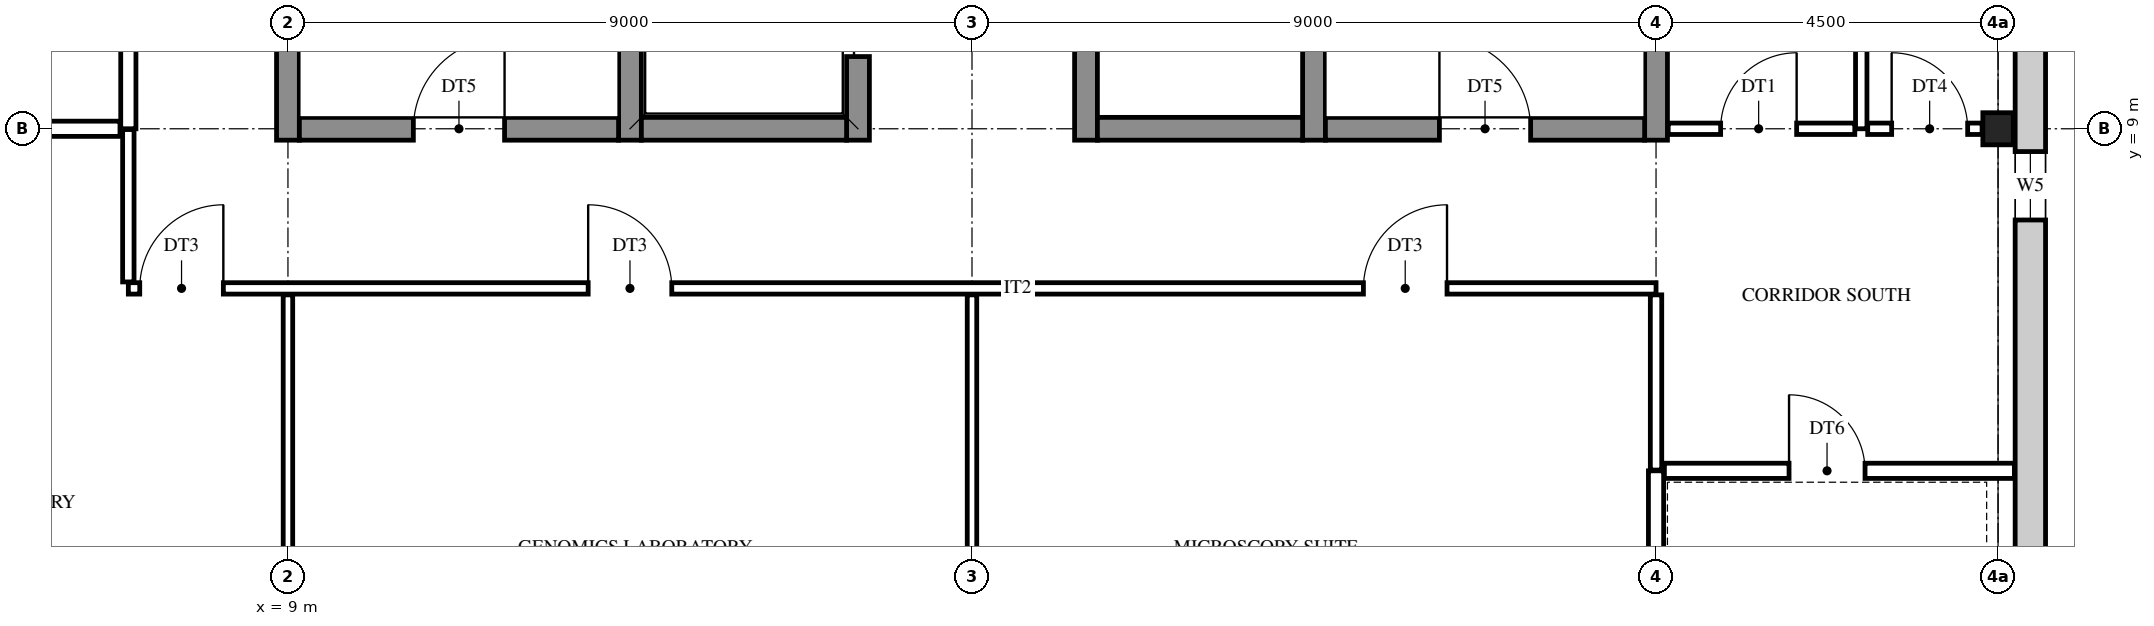
"""IFC4 building model, lengths in metres.
Left out: names, types, materials, properties, quantities, classifications, styles, units other than length and angle.
Written with IfcOpenShell. Run it as: python <this file> out.ifc"""

import sys

from ifc_helpers import new_model, si_unit, direction, frame, frame_2d, origin, origin_2d, place, context, subcontext, project, spatial, rectangle, i_section, extrude, element, fill, save


model = new_model("IFC4")
c1 = context("Model", 3, precision=1e-05, world=origin(), true_north=direction((0.0, 1.0)))
c2 = subcontext(c1, "Body", "Model", "MODEL_VIEW")
j1 = project(units=[si_unit("LENGTHUNIT", "METRE"), si_unit("PLANEANGLEUNIT", "RADIAN")], contexts=[c1])
p1 = place(None, origin())
s1 = spatial("IfcSite", under=j1, at=p1, CompositionType="ELEMENT")
p2 = place(p1, origin())
s2 = spatial("IfcBuilding", under=s1, at=p2, CompositionType="ELEMENT")
p3 = place(p2, frame((0.0, 0.0, 19.2)))
s3 = spatial("IfcBuildingStorey", under=s2, at=p3, CompositionType="ELEMENT", Elevation=19.2)
p4 = place(p3, frame((31.5, 9.0, 0.0), z_axis=(0.0, 0.0, 1.0), x_axis=(1.0, 0.0, 0.0)))
e1 = element("IfcColumn", 1, at=p4, inside=s3, PredefinedType="COLUMN", context=c2, shape_type="SweptSolid", body=[
    extrude(i_section(OverallWidth=0.4, OverallDepth=0.422, WebThickness=0.028, FlangeThickness=0.036, at=origin_2d()), origin(), (0.0, 0.0, 1.0), 4.2),
])
for number, where, z_axis, x_axis in (
    (2, (9.0, 8.85, 0.0), (0.0, 0.0, 1.0), (0.0, 1.0, 0.0)),
    (3, (13.5, 8.85, 0.0), (0.0, 0.0, 1.0), (0.0, 1.0, 0.0)),
):
    element("IfcWall", number, at=place(p3, frame(where, z_axis=z_axis, x_axis=x_axis)), inside=s3, PredefinedType="SHEAR", context=c2, shape_type="SweptSolid", body=[
        extrude(rectangle(XDim=9.3, YDim=0.3, at=frame_2d((4.65, 0.0))), origin(), (0.0, 0.0, 1.0), 4.2),
    ])
p5 = place(p3, frame((16.5, 8.85, 0.0), z_axis=(0.0, 0.0, 1.0), x_axis=(0.0, 1.0, 0.0)))
e4 = element("IfcWall", 4, at=p5, inside=s3, PredefinedType="SHEAR", context=c2, shape_type="SweptSolid", body=[
    extrude(rectangle(XDim=9.3, YDim=0.3, at=frame_2d((4.65, 0.0))), origin(), (0.0, 0.0, 1.0), 4.2),
])
p6 = place(p5, frame((1.1, 0.0, 0.0)))
e5 = element("IfcOpeningElement", 5, at=p6, cuts=e4, PredefinedType="OPENING", context=c2, shape_type="SweptSolid", body=[
    extrude(rectangle(XDim=1.1, YDim=2.1, at=frame_2d((0.55, 1.05))), frame((0.0, 0.16, 0.0), z_axis=(0.0, -1.0, 0.0), x_axis=(1.0, 0.0, 0.0)), (0.0, 0.0, 1.0), 0.32),
])
p7 = place(p5, frame((4.1, 0.0, 0.0)))
e6 = element("IfcOpeningElement", 6, at=p7, cuts=e4, PredefinedType="OPENING", context=c2, shape_type="SweptSolid", body=[
    extrude(rectangle(XDim=1.1, YDim=2.1, at=frame_2d((0.55, 1.05))), frame((0.0, 0.16, 0.0), z_axis=(0.0, -1.0, 0.0), x_axis=(1.0, 0.0, 0.0)), (0.0, 0.0, 1.0), 0.32),
])
p8 = place(p3, frame((19.5, 8.85, 0.0), z_axis=(0.0, 0.0, 1.0), x_axis=(0.0, 1.0, 0.0)))
e7 = element("IfcWall", 7, at=p8, inside=s3, PredefinedType="SHEAR", context=c2, shape_type="SweptSolid", body=[
    extrude(rectangle(XDim=9.3, YDim=0.3, at=frame_2d((4.65, 0.0))), origin(), (0.0, 0.0, 1.0), 4.2),
])
p9 = place(p8, frame((3.95, 0.0, 0.0)))
e8 = element("IfcOpeningElement", 8, at=p9, cuts=e7, PredefinedType="OPENING", context=c2, shape_type="SweptSolid", body=[
    extrude(rectangle(XDim=1.4, YDim=2.1, at=frame_2d((0.7, 1.05))), frame((0.0, 0.16, 0.0), z_axis=(0.0, -1.0, 0.0), x_axis=(1.0, 0.0, 0.0)), (0.0, 0.0, 1.0), 0.32),
])
p10 = place(p8, frame((7.1, 0.0, 0.0)))
e9 = element("IfcOpeningElement", 9, at=p10, cuts=e7, PredefinedType="OPENING", context=c2, shape_type="SweptSolid", body=[
    extrude(rectangle(XDim=1.1, YDim=2.1, at=frame_2d((0.55, 1.05))), frame((0.0, 0.16, 0.0), z_axis=(0.0, -1.0, 0.0), x_axis=(1.0, 0.0, 0.0)), (0.0, 0.0, 1.0), 0.32),
])
for number, where, z_axis, x_axis in (
    (10, (22.5, 8.85, 0.0), (0.0, 0.0, 1.0), (0.0, 1.0, 0.0)),
    (11, (27.0, 8.85, 0.0), (0.0, 0.0, 1.0), (0.0, 1.0, 0.0)),
):
    element("IfcWall", number, at=place(p3, frame(where, z_axis=z_axis, x_axis=x_axis)), inside=s3, PredefinedType="SHEAR", context=c2, shape_type="SweptSolid", body=[
        extrude(rectangle(XDim=9.3, YDim=0.3, at=frame_2d((4.65, 0.0))), origin(), (0.0, 0.0, 1.0), 4.2),
    ])
p11 = place(p3, frame((9.15, 9.0, 0.0), z_axis=(0.0, 0.0, 1.0), x_axis=(1.0, 0.0, 0.0)))
e12 = element("IfcWall", 12, at=p11, inside=s3, PredefinedType="SHEAR", context=c2, shape_type="SweptSolid", body=[
    extrude(rectangle(XDim=4.2, YDim=0.3, at=frame_2d((2.1, 0.0))), origin(), (0.0, 0.0, 1.0), 4.2),
])
p12 = place(p11, frame((1.5, 0.0, 0.0)))
e13 = element("IfcOpeningElement", 13, at=p12, cuts=e12, PredefinedType="OPENING", context=c2, shape_type="SweptSolid", body=[
    extrude(rectangle(XDim=1.2, YDim=2.1, at=frame_2d((0.6, 1.05))), frame((0.0, 0.16, 0.0), z_axis=(0.0, -1.0, 0.0), x_axis=(1.0, 0.0, 0.0)), (0.0, 0.0, 1.0), 0.32),
])
for number, where, z_axis, x_axis in (
    (14, (13.65, 9.0, 0.0), (0.0, 0.0, 1.0), (1.0, 0.0, 0.0)),
    (15, (19.65, 9.0, 0.0), (0.0, 0.0, 1.0), (1.0, 0.0, 0.0)),
):
    element("IfcWall", number, at=place(p3, frame(where, z_axis=z_axis, x_axis=x_axis)), inside=s3, PredefinedType="SHEAR", context=c2, shape_type="SweptSolid", body=[
        extrude(rectangle(XDim=2.7, YDim=0.3, at=frame_2d((1.35, 0.0))), origin(), (0.0, 0.0, 1.0), 4.2),
    ])
p13 = place(p3, frame((22.65, 9.0, 0.0), z_axis=(0.0, 0.0, 1.0), x_axis=(1.0, 0.0, 0.0)))
e16 = element("IfcWall", 16, at=p13, inside=s3, PredefinedType="SHEAR", context=c2, shape_type="SweptSolid", body=[
    extrude(rectangle(XDim=4.2, YDim=0.3, at=frame_2d((2.1, 0.0))), origin(), (0.0, 0.0, 1.0), 4.2),
])
p14 = place(p13, frame((1.5, 0.0, 0.0)))
e17 = element("IfcOpeningElement", 17, at=p14, cuts=e16, PredefinedType="OPENING", context=c2, shape_type="SweptSolid", body=[
    extrude(rectangle(XDim=1.2, YDim=2.1, at=frame_2d((0.6, 1.05))), frame((0.0, 0.16, 0.0), z_axis=(0.0, -1.0, 0.0), x_axis=(1.0, 0.0, 0.0)), (0.0, 0.0, 1.0), 0.32),
])
p15 = place(p3, frame((31.925, 27.225, 0.0), z_axis=(0.0, 0.0, 1.0), x_axis=(0.0, -1.0, 0.0)))
e18 = element("IfcWall", 18, at=p15, inside=s3, PredefinedType="STANDARD", context=c2, shape_type="SweptSolid", body=[
    extrude(rectangle(XDim=27.45, YDim=0.4, at=frame_2d((13.725, 0.0))), origin(), (0.0, 0.0, 1.0), 4.2),
])
p16 = place(p15, frame((26.025, 0.0, 0.9)))
e19 = element("IfcOpeningElement", 19, at=p16, cuts=e18, PredefinedType="OPENING", context=c2, shape_type="SweptSolid", body=[
    extrude(rectangle(XDim=0.9, YDim=2.0, at=frame_2d((0.45, 1.0))), frame((0.0, 0.21, 0.0), z_axis=(0.0, -1.0, 0.0), x_axis=(1.0, 0.0, 0.0)), (0.0, 0.0, 1.0), 0.42),
])
p17 = place(p15, frame((18.525, 0.0, 0.9)))
e20 = element("IfcOpeningElement", 20, at=p17, cuts=e18, PredefinedType="OPENING", context=c2, shape_type="SweptSolid", body=[
    extrude(rectangle(XDim=0.9, YDim=2.0, at=frame_2d((0.45, 1.0))), frame((0.0, 0.21, 0.0), z_axis=(0.0, -1.0, 0.0), x_axis=(1.0, 0.0, 0.0)), (0.0, 0.0, 1.0), 0.42),
])
p18 = place(p15, frame((15.675, 0.0, 1.6)))
e21 = element("IfcOpeningElement", 21, at=p18, cuts=e18, PredefinedType="OPENING", context=c2, shape_type="SweptSolid", body=[
    extrude(rectangle(XDim=0.6, YDim=0.9, at=frame_2d((0.3, 0.45))), frame((0.0, 0.21, 0.0), z_axis=(0.0, -1.0, 0.0), x_axis=(1.0, 0.0, 0.0)), (0.0, 0.0, 1.0), 0.42),
])
p19 = place(p15, frame((11.175, 0.0, 1.6)))
e22 = element("IfcOpeningElement", 22, at=p19, cuts=e18, PredefinedType="OPENING", context=c2, shape_type="SweptSolid", body=[
    extrude(rectangle(XDim=0.6, YDim=0.9, at=frame_2d((0.3, 0.45))), frame((0.0, 0.21, 0.0), z_axis=(0.0, -1.0, 0.0), x_axis=(1.0, 0.0, 0.0)), (0.0, 0.0, 1.0), 0.42),
])
p20 = place(p15, frame((8.025, 0.0, 0.9)))
e23 = element("IfcOpeningElement", 23, at=p20, cuts=e18, PredefinedType="OPENING", context=c2, shape_type="SweptSolid", body=[
    extrude(rectangle(XDim=0.9, YDim=2.0, at=frame_2d((0.45, 1.0))), frame((0.0, 0.21, 0.0), z_axis=(0.0, -1.0, 0.0), x_axis=(1.0, 0.0, 0.0)), (0.0, 0.0, 1.0), 0.42),
])
p21 = place(p15, frame((0.525, 0.0, 0.9)))
e24 = element("IfcOpeningElement", 24, at=p21, cuts=e18, PredefinedType="OPENING", context=c2, shape_type="SweptSolid", body=[
    extrude(rectangle(XDim=0.9, YDim=2.0, at=frame_2d((0.45, 1.0))), frame((0.0, 0.21, 0.0), z_axis=(0.0, -1.0, 0.0), x_axis=(1.0, 0.0, 0.0)), (0.0, 0.0, 1.0), 0.42),
])
p22 = place(p3, frame((6.9, 6.985, 0.0), z_axis=(0.0, 0.0, 1.0), x_axis=(0.0, 1.0, 0.0)))
e25 = element("IfcWall", 25, at=p22, inside=s3, PredefinedType="PARTITIONING", context=c2, shape_type="SweptSolid", body=[
    extrude(rectangle(XDim=2.005, YDim=0.15, at=frame_2d((1.002, 0.0))), origin(), (0.0, 0.0, 1.0), 3.537),
])
p23 = place(p3, frame((6.9, 9.0, 0.0), z_axis=(0.0, 0.0, 1.0), x_axis=(0.0, 1.0, 0.0)))
e26 = element("IfcWall", 26, at=p23, inside=s3, PredefinedType="PARTITIONING", context=c2, shape_type="SweptSolid", body=[
    extrude(rectangle(XDim=9.0, YDim=0.2, at=frame_2d((4.5, 0.0))), origin(), (0.0, 0.0, 1.0), 3.537),
])
p24 = place(p23, frame((1.75, 0.0, 0.0)))
e27 = element("IfcOpeningElement", 27, at=p24, cuts=e26, PredefinedType="OPENING", context=c2, shape_type="SweptSolid", body=[
    extrude(rectangle(XDim=1.0, YDim=2.1, at=frame_2d((0.5, 1.05))), frame((0.0, 0.11, 0.0), z_axis=(0.0, -1.0, 0.0), x_axis=(1.0, 0.0, 0.0)), (0.0, 0.0, 1.0), 0.22),
])
p25 = place(p23, frame((6.25, 0.0, 0.0)))
e28 = element("IfcOpeningElement", 28, at=p25, cuts=e26, PredefinedType="OPENING", context=c2, shape_type="SweptSolid", body=[
    extrude(rectangle(XDim=1.0, YDim=2.1, at=frame_2d((0.5, 1.05))), frame((0.0, 0.11, 0.0), z_axis=(0.0, -1.0, 0.0), x_axis=(1.0, 0.0, 0.0)), (0.0, 0.0, 1.0), 0.22),
])
for number, where, z_axis, x_axis in (
    (29, (9.0, 0.221, 0.0), (0.0, 0.0, 1.0), (0.0, 1.0, 0.0)),
    (30, (18.0, 0.221, 0.0), (0.0, 0.0, 1.0), (0.0, 1.0, 0.0)),
):
    element("IfcWall", number, at=place(p3, frame(where, z_axis=z_axis, x_axis=x_axis)), inside=s3, PredefinedType="PARTITIONING", context=c2, shape_type="SweptSolid", body=[
        extrude(rectangle(XDim=6.594, YDim=0.125, at=frame_2d((3.297, 0.0))), origin(), (0.0, 0.0, 1.0), 3.537),
    ])
p26 = place(p3, frame((27.0, 0.221, 0.0), z_axis=(0.0, 0.0, 1.0), x_axis=(0.0, 1.0, 0.0)))
e31 = element("IfcWall", 31, at=p26, inside=s3, PredefinedType="PARTITIONING", context=c2, shape_type="SweptSolid", body=[
    extrude(rectangle(XDim=4.279, YDim=0.2, at=frame_2d((2.14, 0.0))), origin(), (0.0, 0.0, 1.0), 3.537),
])
p27 = place(p3, frame((27.0, 4.51, 0.0), z_axis=(0.0, 0.0, 1.0), x_axis=(0.0, 1.0, 0.0)))
e32 = element("IfcWall", 32, at=p27, inside=s3, PredefinedType="PARTITIONING", context=c2, shape_type="SweptSolid", body=[
    extrude(rectangle(XDim=2.305, YDim=0.15, at=frame_2d((1.152, 0.0))), origin(), (0.0, 0.0, 1.0), 3.537),
])
p28 = place(p3, frame((29.7, 9.0, 0.0), z_axis=(0.0, 0.0, 1.0), x_axis=(0.0, 1.0, 0.0)))
e33 = element("IfcWall", 33, at=p28, inside=s3, PredefinedType="PARTITIONING", context=c2, shape_type="SweptSolid", body=[
    extrude(rectangle(XDim=6.3, YDim=0.15, at=frame_2d((3.15, 0.0))), origin(), (0.0, 0.0, 1.0), 3.537),
])
p29 = place(p28, frame((4.0, 0.0, 0.0)))
e34 = element("IfcOpeningElement", 34, at=p29, cuts=e33, PredefinedType="OPENING", context=c2, shape_type="SweptSolid", body=[
    extrude(rectangle(XDim=1.0, YDim=2.1, at=frame_2d((0.5, 1.05))), frame((0.0, 0.085, 0.0), z_axis=(0.0, -1.0, 0.0), x_axis=(1.0, 0.0, 0.0)), (0.0, 0.0, 1.0), 0.17),
])
p30 = place(p3, frame((27.11, 4.5, 0.0), z_axis=(0.0, 0.0, 1.0), x_axis=(1.0, 0.0, 0.0)))
e35 = element("IfcWall", 35, at=p30, inside=s3, PredefinedType="PARTITIONING", context=c2, shape_type="SweptSolid", body=[
    extrude(rectangle(XDim=4.605, YDim=0.2, at=frame_2d((2.302, 0.0))), origin(), (0.0, 0.0, 1.0), 3.537),
])
p31 = place(p30, frame((1.64, 0.0, 0.0)))
e36 = element("IfcOpeningElement", 36, at=p31, cuts=e35, PredefinedType="OPENING", context=c2, shape_type="SweptSolid", body=[
    extrude(rectangle(XDim=1.0, YDim=2.1, at=frame_2d((0.5, 1.05))), frame((0.0, 0.11, 0.0), z_axis=(0.0, -1.0, 0.0), x_axis=(1.0, 0.0, 0.0)), (0.0, 0.0, 1.0), 0.22),
])
p32 = place(p3, frame((6.9, 6.9, 0.0), z_axis=(0.0, 0.0, 1.0), x_axis=(1.0, 0.0, 0.0)))
e37 = element("IfcWall", 37, at=p32, inside=s3, PredefinedType="PARTITIONING", context=c2, shape_type="SweptSolid", body=[
    extrude(rectangle(XDim=20.1, YDim=0.15, at=frame_2d((10.05, 0.0))), origin(), (0.0, 0.0, 1.0), 3.537),
])
p33 = place(p32, frame((0.15, 0.0, 0.0)))
e38 = element("IfcOpeningElement", 38, at=p33, cuts=e37, PredefinedType="OPENING", context=c2, shape_type="SweptSolid", body=[
    extrude(rectangle(XDim=1.1, YDim=2.1, at=frame_2d((0.55, 1.05))), frame((0.0, 0.085, 0.0), z_axis=(0.0, -1.0, 0.0), x_axis=(1.0, 0.0, 0.0)), (0.0, 0.0, 1.0), 0.17),
])
p34 = place(p32, frame((6.05, 0.0, 0.0)))
e39 = element("IfcOpeningElement", 39, at=p34, cuts=e37, PredefinedType="OPENING", context=c2, shape_type="SweptSolid", body=[
    extrude(rectangle(XDim=1.1, YDim=2.1, at=frame_2d((0.55, 1.05))), frame((0.0, 0.085, 0.0), z_axis=(0.0, -1.0, 0.0), x_axis=(1.0, 0.0, 0.0)), (0.0, 0.0, 1.0), 0.17),
])
p35 = place(p32, frame((16.25, 0.0, 0.0)))
e40 = element("IfcOpeningElement", 40, at=p35, cuts=e37, PredefinedType="OPENING", context=c2, shape_type="SweptSolid", body=[
    extrude(rectangle(XDim=1.1, YDim=2.1, at=frame_2d((0.55, 1.05))), frame((0.0, 0.085, 0.0), z_axis=(0.0, -1.0, 0.0), x_axis=(1.0, 0.0, 0.0)), (0.0, 0.0, 1.0), 0.17),
])
p36 = place(p3, frame((0.21, 9.0, 0.0), z_axis=(0.0, 0.0, 1.0), x_axis=(1.0, 0.0, 0.0)))
e41 = element("IfcWall", 41, at=p36, inside=s3, PredefinedType="PARTITIONING", context=c2, shape_type="SweptSolid", body=[
    extrude(rectangle(XDim=6.58, YDim=0.2, at=frame_2d((3.29, 0.0))), origin(), (0.0, 0.0, 1.0), 3.537),
])
p37 = place(p3, frame((27.16, 9.0, 0.0), z_axis=(0.0, 0.0, 1.0), x_axis=(1.0, 0.0, 0.0)))
e42 = element("IfcWall", 42, at=p37, inside=s3, PredefinedType="PARTITIONING", context=c2, shape_type="SweptSolid", body=[
    extrude(rectangle(XDim=2.455, YDim=0.15, at=frame_2d((1.228, 0.0))), origin(), (0.0, 0.0, 1.0), 3.537),
])
p38 = place(p37, frame((0.69, 0.0, 0.0)))
e43 = element("IfcOpeningElement", 43, at=p38, cuts=e42, PredefinedType="OPENING", context=c2, shape_type="SweptSolid", body=[
    extrude(rectangle(XDim=1.0, YDim=2.1, at=frame_2d((0.5, 1.05))), frame((0.0, 0.085, 0.0), z_axis=(0.0, -1.0, 0.0), x_axis=(1.0, 0.0, 0.0)), (0.0, 0.0, 1.0), 0.17),
])
p39 = place(p3, frame((29.785, 9.0, 0.0), z_axis=(0.0, 0.0, 1.0), x_axis=(1.0, 0.0, 0.0)))
e44 = element("IfcWall", 44, at=p39, inside=s3, PredefinedType="PARTITIONING", context=c2, shape_type="SweptSolid", body=[
    extrude(rectangle(XDim=1.505, YDim=0.15, at=frame_2d((0.752, 0.0))), origin(), (0.0, 0.0, 1.0), 3.537),
])
p40 = place(p39, frame((0.315, 0.0, 0.0)))
e45 = element("IfcOpeningElement", 45, at=p40, cuts=e44, PredefinedType="OPENING", context=c2, shape_type="SweptSolid", body=[
    extrude(rectangle(XDim=1.0, YDim=2.1, at=frame_2d((0.5, 1.05))), frame((0.0, 0.085, 0.0), z_axis=(0.0, -1.0, 0.0), x_axis=(1.0, 0.0, 0.0)), (0.0, 0.0, 1.0), 0.17),
])
p41 = place(p17, origin())
e46 = element("IfcWindow", 46, at=p41, inside=s3, PartitioningType="SINGLE_PANEL", PredefinedType="WINDOW", context=c2, shape_type="SweptSolid", body=[
    extrude(rectangle(XDim=0.9, YDim=2.0, at=frame_2d((0.45, 1.0))), frame((0.0, 0.03, 0.0), z_axis=(0.0, -1.0, 0.0), x_axis=(1.0, 0.0, 0.0)), (0.0, 0.0, 1.0), 0.06),
])
fill(e20, e46)
p42 = place(p12, origin())
e47 = element("IfcDoor", 47, at=p42, inside=s3, OperationType="SINGLE_SWING_RIGHT", PredefinedType="DOOR", context=c2, shape_type="SweptSolid", body=[
    extrude(rectangle(XDim=1.2, YDim=2.1, at=frame_2d((0.6, 1.05))), frame((0.0, 0.025, 0.0), z_axis=(0.0, -1.0, 0.0), x_axis=(1.0, 0.0, 0.0)), (0.0, 0.0, 1.0), 0.05),
])
fill(e13, e47)
p43 = place(p14, origin())
e48 = element("IfcDoor", 48, at=p43, inside=s3, OperationType="SINGLE_SWING_LEFT", PredefinedType="DOOR", context=c2, shape_type="SweptSolid", body=[
    extrude(rectangle(XDim=1.2, YDim=2.1, at=frame_2d((0.6, 1.05))), frame((0.0, 0.025, 0.0), z_axis=(0.0, -1.0, 0.0), x_axis=(1.0, 0.0, 0.0)), (0.0, 0.0, 1.0), 0.05),
])
fill(e17, e48)
p44 = place(p38, origin())
e49 = element("IfcDoor", 49, at=p44, inside=s3, OperationType="SINGLE_SWING_RIGHT", PredefinedType="DOOR", context=c2, shape_type="SweptSolid", body=[
    extrude(rectangle(XDim=1.0, YDim=2.1, at=frame_2d((0.5, 1.05))), frame((0.0, 0.025, 0.0), z_axis=(0.0, -1.0, 0.0), x_axis=(1.0, 0.0, 0.0)), (0.0, 0.0, 1.0), 0.05),
])
fill(e43, e49)
p45 = place(p40, origin())
e50 = element("IfcDoor", 50, at=p45, inside=s3, OperationType="SINGLE_SWING_LEFT", PredefinedType="DOOR", context=c2, shape_type="SweptSolid", body=[
    extrude(rectangle(XDim=1.0, YDim=2.1, at=frame_2d((0.5, 1.05))), frame((0.0, 0.025, 0.0), z_axis=(0.0, -1.0, 0.0), x_axis=(1.0, 0.0, 0.0)), (0.0, 0.0, 1.0), 0.05),
])
fill(e45, e50)
p46 = place(p31, frame((1.0, 0.0, 0.0), z_axis=(0.0, 0.0, 1.0), x_axis=(-1.0, 0.0, 0.0)))
e51 = element("IfcDoor", 51, at=p46, inside=s3, OperationType="SINGLE_SWING_LEFT", PredefinedType="DOOR", context=c2, shape_type="SweptSolid", body=[
    extrude(rectangle(XDim=1.0, YDim=2.1, at=frame_2d((0.5, 1.05))), frame((0.0, 0.025, 0.0), z_axis=(0.0, -1.0, 0.0), x_axis=(1.0, 0.0, 0.0)), (0.0, 0.0, 1.0), 0.05),
])
fill(e36, e51)
p47 = place(p33, frame((1.1, 0.0, 0.0), z_axis=(0.0, 0.0, 1.0), x_axis=(-1.0, 0.0, 0.0)))
e52 = element("IfcDoor", 52, at=p47, inside=s3, OperationType="SINGLE_SWING_RIGHT", PredefinedType="DOOR", context=c2, shape_type="SweptSolid", body=[
    extrude(rectangle(XDim=1.1, YDim=2.1, at=frame_2d((0.55, 1.05))), frame((0.0, 0.025, 0.0), z_axis=(0.0, -1.0, 0.0), x_axis=(1.0, 0.0, 0.0)), (0.0, 0.0, 1.0), 0.05),
])
fill(e38, e52)
p48 = place(p34, frame((1.1, 0.0, 0.0), z_axis=(0.0, 0.0, 1.0), x_axis=(-1.0, 0.0, 0.0)))
e53 = element("IfcDoor", 53, at=p48, inside=s3, OperationType="SINGLE_SWING_LEFT", PredefinedType="DOOR", context=c2, shape_type="SweptSolid", body=[
    extrude(rectangle(XDim=1.1, YDim=2.1, at=frame_2d((0.55, 1.05))), frame((0.0, 0.025, 0.0), z_axis=(0.0, -1.0, 0.0), x_axis=(1.0, 0.0, 0.0)), (0.0, 0.0, 1.0), 0.05),
])
fill(e39, e53)
p49 = place(p35, frame((1.1, 0.0, 0.0), z_axis=(0.0, 0.0, 1.0), x_axis=(-1.0, 0.0, 0.0)))
e54 = element("IfcDoor", 54, at=p49, inside=s3, OperationType="SINGLE_SWING_RIGHT", PredefinedType="DOOR", context=c2, shape_type="SweptSolid", body=[
    extrude(rectangle(XDim=1.1, YDim=2.1, at=frame_2d((0.55, 1.05))), frame((0.0, 0.025, 0.0), z_axis=(0.0, -1.0, 0.0), x_axis=(1.0, 0.0, 0.0)), (0.0, 0.0, 1.0), 0.05),
])
fill(e40, e54)
p50 = place(p6, origin())
e55 = element("IfcDoor", 55, at=p50, inside=s3, OperationType="DOUBLE_DOOR_SLIDING", PredefinedType="DOOR", context=c2, shape_type="SweptSolid", body=[
    extrude(rectangle(XDim=1.1, YDim=2.1, at=frame_2d((0.55, 1.05))), frame((0.0, 0.025, 0.0), z_axis=(0.0, -1.0, 0.0), x_axis=(1.0, 0.0, 0.0)), (0.0, 0.0, 1.0), 0.05),
])
fill(e5, e55)
save(model, sys.argv[1])
